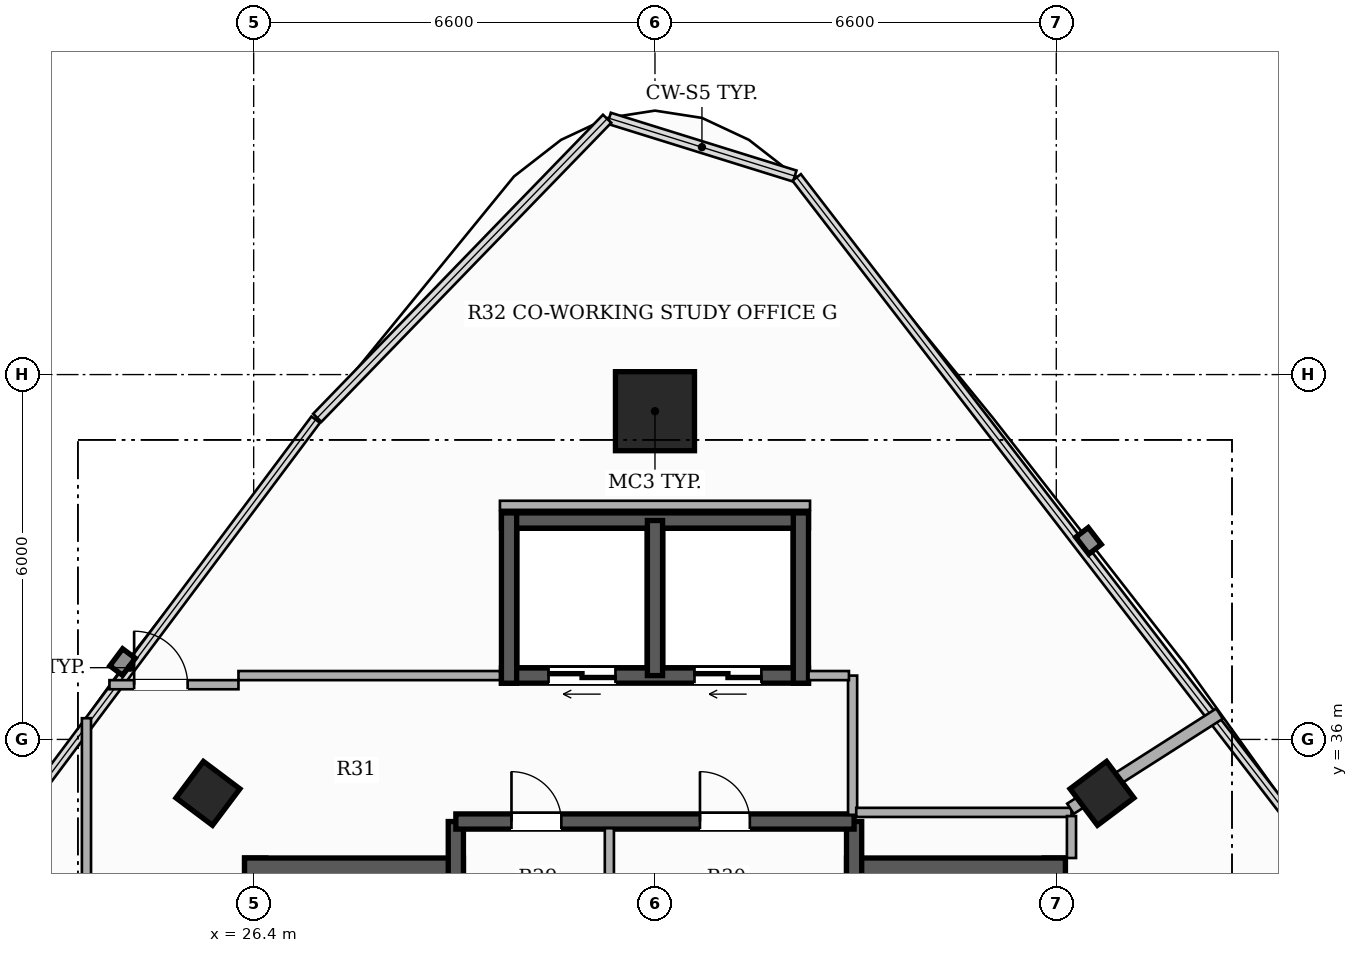
"""IFC4 building model, lengths in metres.
Left out: names, types, materials, properties, quantities, classifications, styles, units other than length and angle.
Written with IfcOpenShell. Run it as: python <this file> out.ifc"""

import sys

from ifc_helpers import new_model, si_unit, direction, frame, frame_2d, origin, origin_2d, place, context, subcontext, project, spatial, rectangle, hollow_rectangle, extrude, element, fill, save


model = new_model("IFC4")
c1 = context("Model", 3, precision=1e-05, world=origin(), true_north=direction((0.0, 1.0)))
c2 = subcontext(c1, "Body", "Model", "MODEL_VIEW")
j1 = project(units=[si_unit("LENGTHUNIT", "METRE"), si_unit("PLANEANGLEUNIT", "RADIAN")], contexts=[c1])
p1 = place(None, origin())
s1 = spatial("IfcSite", under=j1, at=p1, CompositionType="ELEMENT")
p2 = place(p1, origin())
s2 = spatial("IfcBuilding", under=s1, at=p2, CompositionType="ELEMENT")
p3 = place(p2, frame((0.0, 0.0, 206.3)))
s3 = spatial("IfcBuildingStorey", under=s2, at=p3, CompositionType="ELEMENT", Elevation=206.3)
p4 = place(p3, frame((26.425, 26.55, 0.0), z_axis=(0.0, 0.0, 1.0), x_axis=(0.0, 1.0, 0.0)))
e1 = element("IfcWall", 1, at=p4, inside=s3, PredefinedType="SHEAR", context=c2, shape_type="SweptSolid", body=[
    extrude(rectangle(XDim=7.5, YDim=0.35, at=frame_2d((3.75, 0.0))), origin(), (0.0, 0.0, 1.0), 3.3),
])
p5 = place(p3, frame((26.25, 33.875, 0.0), z_axis=(0.0, 0.0, 1.0), x_axis=(1.0, 0.0, 0.0)))
e2 = element("IfcWall", 2, at=p5, inside=s3, PredefinedType="SHEAR", context=c2, shape_type="SweptSolid", body=[
    extrude(rectangle(XDim=3.6, YDim=0.35, at=frame_2d((1.8, 0.0))), origin(), (0.0, 0.0, 1.0), 3.3),
])
p6 = place(p3, frame((39.575, 26.55, 0.0), z_axis=(0.0, 0.0, 1.0), x_axis=(0.0, 1.0, 0.0)))
e3 = element("IfcWall", 3, at=p6, inside=s3, PredefinedType="SHEAR", context=c2, shape_type="SweptSolid", body=[
    extrude(rectangle(XDim=7.5, YDim=0.35, at=frame_2d((3.75, 0.0))), origin(), (0.0, 0.0, 1.0), 3.3),
])
p7 = place(p3, frame((36.15, 33.875, 0.0), z_axis=(0.0, 0.0, 1.0), x_axis=(1.0, 0.0, 0.0)))
e4 = element("IfcWall", 4, at=p7, inside=s3, PredefinedType="SHEAR", context=c2, shape_type="SweptSolid", body=[
    extrude(rectangle(XDim=3.6, YDim=0.35, at=frame_2d((1.8, 0.0))), origin(), (0.0, 0.0, 1.0), 3.3),
])
p8 = place(p3, frame((29.725, 26.55, 0.0), z_axis=(0.0, 0.0, 1.0), x_axis=(0.0, 1.0, 0.0)))
e5 = element("IfcWall", 5, at=p8, inside=s3, PredefinedType="SHEAR", context=c2, shape_type="SweptSolid", body=[
    extrude(rectangle(XDim=8.1, YDim=0.25, at=frame_2d((4.05, 0.0))), origin(), (0.0, 0.0, 1.0), 3.3),
])
p9 = place(p8, frame((0.6, 0.0, 0.0)))
e6 = element("IfcOpeningElement", 6, at=p9, cuts=e5, PredefinedType="OPENING", context=c2, shape_type="SweptSolid", body=[
    extrude(rectangle(XDim=1.05, YDim=2.15, at=frame_2d((0.525, 1.075))), frame((0.0, 0.135, 0.0), z_axis=(0.0, -1.0, 0.0), x_axis=(1.0, 0.0, 0.0)), (0.0, 0.0, 1.0), 0.27),
])
p10 = place(p3, frame((36.275, 26.55, 0.0), z_axis=(0.0, 0.0, 1.0), x_axis=(0.0, 1.0, 0.0)))
e7 = element("IfcWall", 7, at=p10, inside=s3, PredefinedType="SHEAR", context=c2, shape_type="SweptSolid", body=[
    extrude(rectangle(XDim=8.1, YDim=0.25, at=frame_2d((4.05, 0.0))), origin(), (0.0, 0.0, 1.0), 3.3),
])
p11 = place(p10, frame((0.6, 0.0, 0.0)))
e8 = element("IfcOpeningElement", 8, at=p11, cuts=e7, PredefinedType="OPENING", context=c2, shape_type="SweptSolid", body=[
    extrude(rectangle(XDim=1.05, YDim=2.15, at=frame_2d((0.525, 1.075))), frame((0.0, 0.135, 0.0), z_axis=(0.0, -1.0, 0.0), x_axis=(1.0, 0.0, 0.0)), (0.0, 0.0, 1.0), 0.27),
])
p12 = place(p3, frame((29.725, 34.65, 0.0), z_axis=(0.0, 0.0, 1.0), x_axis=(1.0, 0.0, 0.0)))
e9 = element("IfcWall", 9, at=p12, inside=s3, PredefinedType="SHEAR", context=c2, shape_type="SweptSolid", body=[
    extrude(rectangle(XDim=6.55, YDim=0.25, at=frame_2d((3.275, 0.0))), origin(), (0.0, 0.0, 1.0), 3.3),
])
p13 = place(p12, frame((0.915, 0.0, 0.0)))
e10 = element("IfcOpeningElement", 10, at=p13, cuts=e9, PredefinedType="OPENING", context=c2, shape_type="SweptSolid", body=[
    extrude(rectangle(XDim=0.82, YDim=2.1, at=frame_2d((0.41, 1.05))), frame((0.0, 0.135, 0.0), z_axis=(0.0, -1.0, 0.0), x_axis=(1.0, 0.0, 0.0)), (0.0, 0.0, 1.0), 0.27),
])
p14 = place(p12, frame((4.015, 0.0, 0.0)))
e11 = element("IfcOpeningElement", 11, at=p14, cuts=e9, PredefinedType="OPENING", context=c2, shape_type="SweptSolid", body=[
    extrude(rectangle(XDim=0.82, YDim=2.1, at=frame_2d((0.41, 1.05))), frame((0.0, 0.135, 0.0), z_axis=(0.0, -1.0, 0.0), x_axis=(1.0, 0.0, 0.0)), (0.0, 0.0, 1.0), 0.27),
])
p15 = place(p3, frame((35.525, 37.05, 0.0), z_axis=(0.0, 0.0, 1.0), x_axis=(-1.0, 0.0, 0.0)))
e12 = element("IfcWall", 12, at=p15, inside=s3, PredefinedType="SHEAR", context=c2, shape_type="SweptSolid", body=[
    extrude(rectangle(XDim=5.05, YDim=0.25, at=frame_2d((2.525, 0.0))), origin(), (0.0, 0.0, 1.0), 3.3),
])
p16 = place(p15, frame((3.175, 0.0, 0.0)))
e13 = element("IfcOpeningElement", 13, at=p16, cuts=e12, PredefinedType="OPENING", context=c2, shape_type="SweptSolid", body=[
    extrude(rectangle(XDim=1.1, YDim=2.2, at=frame_2d((0.55, 1.1))), frame((0.0, 0.135, 0.0), z_axis=(0.0, -1.0, 0.0), x_axis=(1.0, 0.0, 0.0)), (0.0, 0.0, 1.0), 0.27),
])
p17 = place(p15, frame((0.775, 0.0, 0.0)))
e14 = element("IfcOpeningElement", 14, at=p17, cuts=e12, PredefinedType="OPENING", context=c2, shape_type="SweptSolid", body=[
    extrude(rectangle(XDim=1.1, YDim=2.2, at=frame_2d((0.55, 1.1))), frame((0.0, 0.135, 0.0), z_axis=(0.0, -1.0, 0.0), x_axis=(1.0, 0.0, 0.0)), (0.0, 0.0, 1.0), 0.27),
])
p18 = place(p3, frame((30.475, 39.6, 0.0), z_axis=(0.0, 0.0, 1.0), x_axis=(1.0, 0.0, 0.0)))
e15 = element("IfcWall", 15, at=p18, inside=s3, PredefinedType="SHEAR", context=c2, shape_type="SweptSolid", body=[
    extrude(rectangle(XDim=5.05, YDim=0.25, at=frame_2d((2.525, 0.0))), origin(), (0.0, 0.0, 1.0), 3.3),
])
for number, where, z_axis, x_axis in (
    (16, (30.6, 36.925, 0.0), (0.0, 0.0, 1.0), (0.0, 1.0, 0.0)),
    (17, (35.4, 36.925, 0.0), (0.0, 0.0, 1.0), (0.0, 1.0, 0.0)),
):
    element("IfcWall", number, at=place(p3, frame(where, z_axis=z_axis, x_axis=x_axis)), inside=s3, PredefinedType="SHEAR", context=c2, shape_type="SweptSolid", body=[
        extrude(rectangle(XDim=2.8, YDim=0.25, at=frame_2d((1.4, 0.0))), origin(), (0.0, 0.0, 1.0), 3.3),
    ])
p19 = place(p3, frame((33.0, 37.05, 0.0), z_axis=(0.0, 0.0, 1.0), x_axis=(0.0, 1.0, 0.0)))
e18 = element("IfcWall", 18, at=p19, inside=s3, PredefinedType="SHEAR", context=c2, shape_type="SweptSolid", body=[
    extrude(rectangle(XDim=2.55, YDim=0.25, at=frame_2d((1.275, 0.0))), origin(), (0.0, 0.0, 1.0), 3.3),
])
p20 = place(p3, frame((33.0, 41.398, 0.0), z_axis=(0.0, 0.0, 1.0), x_axis=(1.0, 0.0, 0.0)))
e19 = element("IfcColumn", 19, at=p20, inside=s3, PredefinedType="COLUMN", context=c2, shape_type="SweptSolid", body=[
    extrude(hollow_rectangle(XDim=1.3, YDim=1.3, WallThickness=0.04, at=origin_2d()), origin(), (0.0, 0.0, 1.0), 3.3),
])
for number, where, z_axis, x_axis in (
    (20, (25.648, 35.113, 0.0), (0.0, 0.0, 1.0), (0.6, 0.8, 0.0)),
    (21, (40.352, 35.113, 0.0), (0.0, 0.0, 1.0), (-0.6, 0.8, 0.0)),
):
    element("IfcColumn", number, at=place(p3, frame(where, z_axis=z_axis, x_axis=x_axis)), inside=s3, PredefinedType="COLUMN", context=c2, shape_type="SweptSolid", body=[
        extrude(hollow_rectangle(XDim=0.75, YDim=0.75, WallThickness=0.025, at=origin_2d()), origin(), (0.0, 0.0, 1.0), 3.3),
    ])
p21 = place(p3, frame((36.25, 34.76, 0.0), z_axis=(0.0, 0.0, 1.0), x_axis=(0.0, 1.0, 0.0)))
e22 = element("IfcWall", 22, at=p21, inside=s3, PredefinedType="PARTITIONING", context=c2, shape_type="SweptSolid", body=[
    extrude(rectangle(XDim=2.29, YDim=0.15, at=frame_2d((1.145, 0.0))), origin(), (0.0, 0.0, 1.0), 2.425),
])
p22 = place(p3, frame((35.525, 37.05, 0.0), z_axis=(0.0, 0.0, 1.0), x_axis=(1.0, 0.0, 0.0)))
e23 = element("IfcWall", 23, at=p22, inside=s3, PredefinedType="PARTITIONING", context=c2, shape_type="SweptSolid", body=[
    extrude(rectangle(XDim=0.665, YDim=0.15, at=frame_2d((0.333, 0.0))), origin(), (0.0, 0.0, 1.0), 2.425),
])
p23 = place(p3, frame((32.25, 32.885, 0.0), z_axis=(0.0, 0.0, 1.0), x_axis=(0.0, 1.0, 0.0)))
e24 = element("IfcWall", 24, at=p23, inside=s3, PredefinedType="PARTITIONING", context=c2, shape_type="SweptSolid", body=[
    extrude(rectangle(XDim=1.655, YDim=0.15, at=frame_2d((0.828, 0.0))), origin(), (0.0, 0.0, 1.0), 3.06),
])
p24 = place(p3, frame((23.65, 23.91, 0.0), z_axis=(0.0, 0.0, 1.0), x_axis=(0.0, 1.0, 0.0)))
e25 = element("IfcWall", 25, at=p24, inside=s3, PredefinedType="PARTITIONING", context=c2, shape_type="SweptSolid", body=[
    extrude(rectangle(XDim=12.439, YDim=0.15, at=frame_2d((6.22, 0.0))), origin(), (0.0, 0.0, 1.0), 2.492),
])
p25 = place(p24, frame((5.759, 0.0, 0.0)))
e26 = element("IfcOpeningElement", 26, at=p25, cuts=e25, PredefinedType="OPENING", context=c2, shape_type="SweptSolid", body=[
    extrude(rectangle(XDim=0.92, YDim=2.15, at=frame_2d((0.46, 1.075))), frame((0.0, 0.085, 0.0), z_axis=(0.0, -1.0, 0.0), x_axis=(1.0, 0.0, 0.0)), (0.0, 0.0, 1.0), 0.17),
])
p26 = place(p3, frame((24.028, 36.9, 0.0), z_axis=(0.0, 0.0, 1.0), x_axis=(1.0, 0.0, 0.0)))
e27 = element("IfcWall", 27, at=p26, inside=s3, PredefinedType="PARTITIONING", context=c2, shape_type="SweptSolid", body=[
    extrude(rectangle(XDim=2.122, YDim=0.15, at=frame_2d((1.061, 0.0))), origin(), (0.0, 0.0, 1.0), 2.619),
])
p27 = place(p26, frame((0.406, 0.0, 0.0)))
e28 = element("IfcOpeningElement", 28, at=p27, cuts=e27, PredefinedType="OPENING", context=c2, shape_type="SweptSolid", body=[
    extrude(rectangle(XDim=0.88, YDim=2.1, at=frame_2d((0.44, 1.05))), frame((0.0, 0.085, 0.0), z_axis=(0.0, -1.0, 0.0), x_axis=(1.0, 0.0, 0.0)), (0.0, 0.0, 1.0), 0.17),
])
p28 = place(p3, frame((26.15, 37.05, 0.0), z_axis=(0.0, 0.0, 1.0), x_axis=(1.0, 0.0, 0.0)))
e29 = element("IfcWall", 29, at=p28, inside=s3, PredefinedType="PARTITIONING", context=c2, shape_type="SweptSolid", body=[
    extrude(rectangle(XDim=4.3, YDim=0.15, at=frame_2d((2.15, 0.0))), origin(), (0.0, 0.0, 1.0), 2.425),
])
p29 = place(p3, frame((30.45, 39.85, 0.0), z_axis=(0.0, 0.0, 1.0), x_axis=(1.0, 0.0, 0.0)))
e30 = element("IfcWall", 30, at=p29, inside=s3, PredefinedType="PARTITIONING", context=c2, shape_type="SweptSolid", body=[
    extrude(rectangle(XDim=5.1, YDim=0.15, at=frame_2d((2.55, 0.0))), origin(), (0.0, 0.0, 1.0), 2.492),
])
p30 = place(p3, frame((36.31, 34.8, 0.0), z_axis=(0.0, 0.0, 1.0), x_axis=(1.0, 0.0, 0.0)))
e31 = element("IfcWall", 31, at=p30, inside=s3, PredefinedType="PARTITIONING", context=c2, shape_type="SweptSolid", body=[
    extrude(rectangle(XDim=3.54, YDim=0.15, at=frame_2d((1.77, 0.0))), origin(), (0.0, 0.0, 1.0), 2.425),
])
p31 = place(p3, frame((39.85, 34.74, 0.0), z_axis=(0.0, 0.0, 1.0), x_axis=(0.0, -1.0, 0.0)))
e32 = element("IfcWall", 32, at=p31, inside=s3, PredefinedType="PARTITIONING", context=c2, shape_type="SweptSolid", body=[
    extrude(rectangle(XDim=0.69, YDim=0.15, at=frame_2d((0.345, 0.0))), origin(), (0.0, 0.0, 1.0), 2.773),
])
p32 = place(p3, frame((39.833, 34.86, 0.0), z_axis=(0.0, 0.0, 1.0), x_axis=(0.842993506682, 0.537923737803, 0.0)))
e33 = element("IfcWall", 33, at=p32, inside=s3, PredefinedType="PARTITIONING", context=c2, shape_type="SweptSolid", body=[
    extrude(rectangle(XDim=2.907, YDim=0.2, at=frame_2d((1.454, 0.0))), origin(), (0.0, 0.0, 1.0), 2.492),
])
p33 = place(p16, origin())
e34 = element("IfcDoor", 34, at=p33, inside=s3, OperationType="DOUBLE_DOOR_SLIDING", PredefinedType="DOOR", context=c2, shape_type="SweptSolid", body=[
    extrude(rectangle(XDim=1.1, YDim=2.2, at=frame_2d((0.55, 1.1))), frame((0.0, 0.025, 0.0), z_axis=(0.0, -1.0, 0.0), x_axis=(1.0, 0.0, 0.0)), (0.0, 0.0, 1.0), 0.05),
])
fill(e13, e34)
p34 = place(p17, origin())
e35 = element("IfcDoor", 35, at=p34, inside=s3, OperationType="DOUBLE_DOOR_SLIDING", PredefinedType="DOOR", context=c2, shape_type="SweptSolid", body=[
    extrude(rectangle(XDim=1.1, YDim=2.2, at=frame_2d((0.55, 1.1))), frame((0.0, 0.025, 0.0), z_axis=(0.0, -1.0, 0.0), x_axis=(1.0, 0.0, 0.0)), (0.0, 0.0, 1.0), 0.05),
])
fill(e14, e35)
p35 = place(p13, origin())
e36 = element("IfcDoor", 36, at=p35, inside=s3, OperationType="SINGLE_SWING_LEFT", PredefinedType="DOOR", context=c2, shape_type="SweptSolid", body=[
    extrude(rectangle(XDim=0.82, YDim=2.1, at=frame_2d((0.41, 1.05))), frame((0.0, 0.025, 0.0), z_axis=(0.0, -1.0, 0.0), x_axis=(1.0, 0.0, 0.0)), (0.0, 0.0, 1.0), 0.05),
])
fill(e10, e36)
p36 = place(p14, origin())
e37 = element("IfcDoor", 37, at=p36, inside=s3, OperationType="SINGLE_SWING_LEFT", PredefinedType="DOOR", context=c2, shape_type="SweptSolid", body=[
    extrude(rectangle(XDim=0.82, YDim=2.1, at=frame_2d((0.41, 1.05))), frame((0.0, 0.025, 0.0), z_axis=(0.0, -1.0, 0.0), x_axis=(1.0, 0.0, 0.0)), (0.0, 0.0, 1.0), 0.05),
])
fill(e11, e37)
p37 = place(p27, origin())
e38 = element("IfcDoor", 38, at=p37, inside=s3, OperationType="SINGLE_SWING_LEFT", PredefinedType="DOOR", context=c2, shape_type="SweptSolid", body=[
    extrude(rectangle(XDim=0.88, YDim=2.1, at=frame_2d((0.44, 1.05))), frame((0.0, 0.025, 0.0), z_axis=(0.0, -1.0, 0.0), x_axis=(1.0, 0.0, 0.0)), (0.0, 0.0, 1.0), 0.05),
])
fill(e28, e38)
save(model, sys.argv[1])
